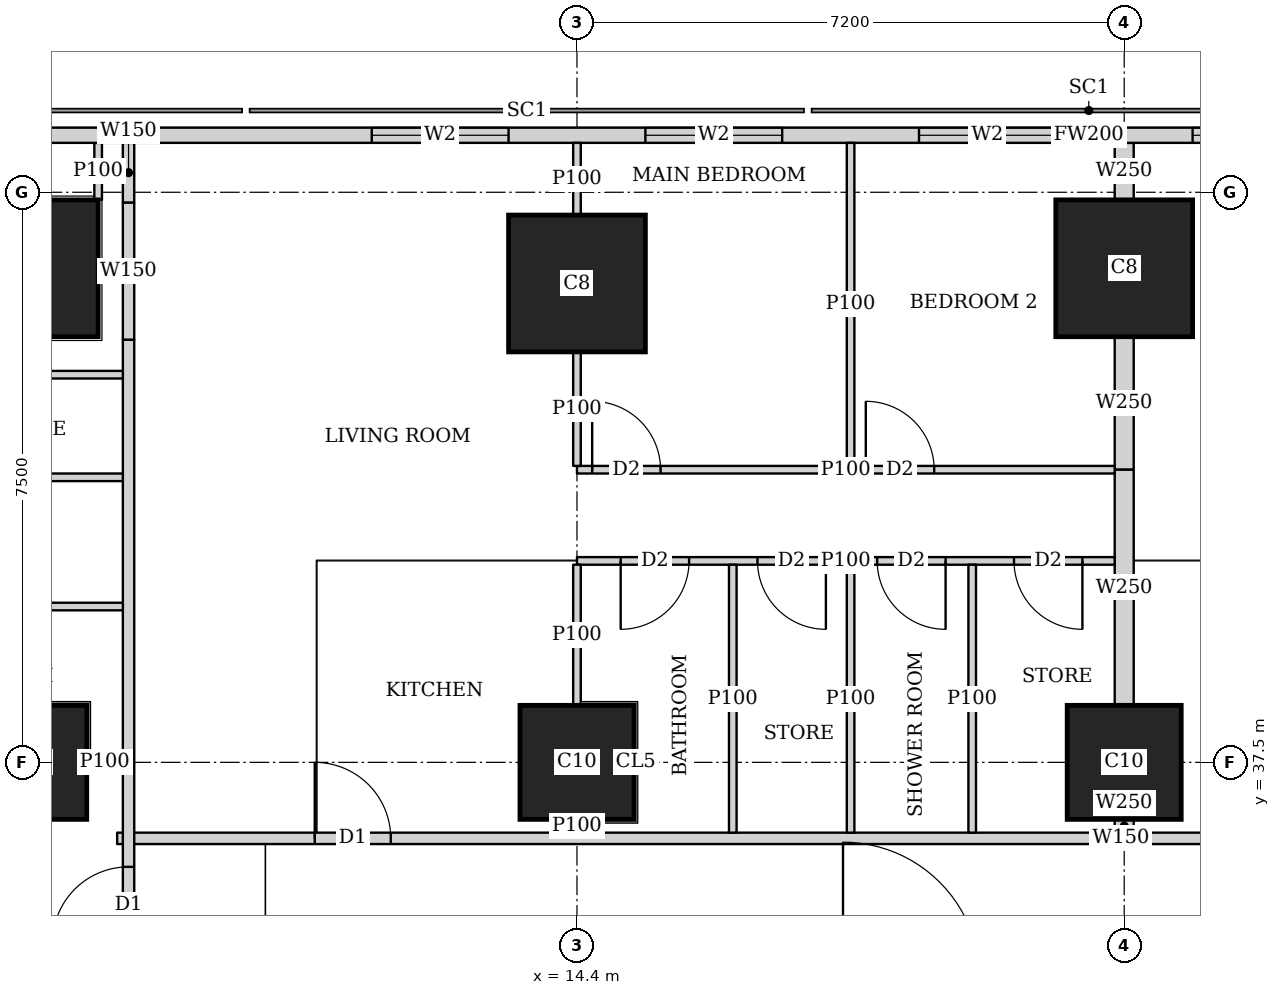
"""IFC4 building model, lengths in metres.
Left out: names, types, materials, properties, quantities, classifications, styles, units other than length and angle.
Written with IfcOpenShell. Run it as: python <this file> out.ifc"""

import sys

from ifc_helpers import new_model, si_unit, direction, frame, frame_2d, origin, origin_2d, place, context, subcontext, project, spatial, rectangle, extrude, element, fill, save


model = new_model("IFC4")
c1 = context("Model", 3, precision=1e-05, world=origin(), true_north=direction((0.0, 1.0)))
c2 = subcontext(c1, "Body", "Model", "MODEL_VIEW")
j1 = project(units=[si_unit("LENGTHUNIT", "METRE"), si_unit("PLANEANGLEUNIT", "RADIAN")], contexts=[c1])
p1 = place(None, origin())
s1 = spatial("IfcSite", under=j1, at=p1, CompositionType="ELEMENT")
p2 = place(p1, origin())
s2 = spatial("IfcBuilding", under=s1, at=p2, CompositionType="ELEMENT")
p3 = place(p2, frame((0.0, 0.0, 184.55)))
s3 = spatial("IfcBuildingStorey", under=s2, at=p3, CompositionType="ELEMENT", Elevation=184.55)
for number, where, z_axis, x_axis in (
    (1, (7.2, 37.5, 0.0), (0.0, 0.0, 1.0), (1.0, 0.0, 0.0)),
    (2, (14.4, 37.5, 0.0), (0.0, 0.0, 1.0), (1.0, 0.0, 0.0)),
    (3, (21.6, 37.5, 0.0), (0.0, 0.0, 1.0), (1.0, 0.0, 0.0)),
):
    element("IfcColumn", number, at=place(p3, frame(where, z_axis=z_axis, x_axis=x_axis)), inside=s3, PredefinedType="COLUMN", context=c2, shape_type="SweptSolid", body=[
        extrude(rectangle(XDim=1.5, YDim=1.5, at=origin_2d()), origin(), (0.0, 0.0, 1.0), 3.75),
    ])
for number, where, z_axis, x_axis in (
    (4, (7.2, 44.0, 0.0), (0.0, 0.0, 1.0), (1.0, 0.0, 0.0)),
    (5, (14.4, 43.8, 0.0), (0.0, 0.0, 1.0), (1.0, 0.0, 0.0)),
    (6, (21.6, 44.0, 0.0), (0.0, 0.0, 1.0), (1.0, 0.0, 0.0)),
):
    element("IfcColumn", number, at=place(p3, frame(where, z_axis=z_axis, x_axis=x_axis)), inside=s3, PredefinedType="COLUMN", context=c2, shape_type="SweptSolid", body=[
        extrude(rectangle(XDim=1.8, YDim=1.8, at=origin_2d()), origin(), (0.0, 0.0, 1.0), 3.75),
    ])
p4 = place(p3, frame((40.106, 45.75, 0.0), z_axis=(0.0, 0.0, 1.0), x_axis=(-1.0, 0.0, 0.0)))
e7 = element("IfcWall", 7, at=p4, inside=s3, PredefinedType="SOLIDWALL", context=c2, shape_type="SweptSolid", body=[
    extrude(rectangle(XDim=37.943, YDim=0.2, at=frame_2d((18.971, 0.0))), origin(), (0.0, 0.0, 1.0), 3.45),
])
p5 = place(p4, frame((8.606, 0.0, 0.9)))
e8 = element("IfcOpeningElement", 8, at=p5, cuts=e7, PredefinedType="OPENING", context=c2, shape_type="SweptSolid", body=[
    extrude(rectangle(XDim=1.8, YDim=1.5, at=frame_2d((0.9, 0.75))), frame((0.0, 0.11, 0.0), z_axis=(0.0, -1.0, 0.0), x_axis=(1.0, 0.0, 0.0)), (0.0, 0.0, 1.0), 0.22),
])
p6 = place(p4, frame((12.206, 0.0, 0.9)))
e9 = element("IfcOpeningElement", 9, at=p6, cuts=e7, PredefinedType="OPENING", context=c2, shape_type="SweptSolid", body=[
    extrude(rectangle(XDim=1.8, YDim=1.5, at=frame_2d((0.9, 0.75))), frame((0.0, 0.11, 0.0), z_axis=(0.0, -1.0, 0.0), x_axis=(1.0, 0.0, 0.0)), (0.0, 0.0, 1.0), 0.22),
])
p7 = place(p4, frame((15.806, 0.0, 0.9)))
e10 = element("IfcOpeningElement", 10, at=p7, cuts=e7, PredefinedType="OPENING", context=c2, shape_type="SweptSolid", body=[
    extrude(rectangle(XDim=1.8, YDim=1.5, at=frame_2d((0.9, 0.75))), frame((0.0, 0.11, 0.0), z_axis=(0.0, -1.0, 0.0), x_axis=(1.0, 0.0, 0.0)), (0.0, 0.0, 1.0), 0.22),
])
p8 = place(p4, frame((19.406, 0.0, 0.9)))
e11 = element("IfcOpeningElement", 11, at=p8, cuts=e7, PredefinedType="OPENING", context=c2, shape_type="SweptSolid", body=[
    extrude(rectangle(XDim=1.8, YDim=1.5, at=frame_2d((0.9, 0.75))), frame((0.0, 0.11, 0.0), z_axis=(0.0, -1.0, 0.0), x_axis=(1.0, 0.0, 0.0)), (0.0, 0.0, 1.0), 0.22),
])
p9 = place(p4, frame((23.006, 0.0, 0.9)))
e12 = element("IfcOpeningElement", 12, at=p9, cuts=e7, PredefinedType="OPENING", context=c2, shape_type="SweptSolid", body=[
    extrude(rectangle(XDim=1.8, YDim=1.5, at=frame_2d((0.9, 0.75))), frame((0.0, 0.11, 0.0), z_axis=(0.0, -1.0, 0.0), x_axis=(1.0, 0.0, 0.0)), (0.0, 0.0, 1.0), 0.22),
])
p10 = place(p4, frame((26.606, 0.0, 0.9)))
e13 = element("IfcOpeningElement", 13, at=p10, cuts=e7, PredefinedType="OPENING", context=c2, shape_type="SweptSolid", body=[
    extrude(rectangle(XDim=1.8, YDim=1.5, at=frame_2d((0.9, 0.75))), frame((0.0, 0.11, 0.0), z_axis=(0.0, -1.0, 0.0), x_axis=(1.0, 0.0, 0.0)), (0.0, 0.0, 1.0), 0.22),
])
p11 = place(p3, frame((8.5, 1.964, 0.0), z_axis=(0.0, 0.0, 1.0), x_axis=(0.0, 1.0, 0.0)))
e14 = element("IfcWall", 14, at=p11, inside=s3, PredefinedType="SOLIDWALL", context=c2, shape_type="SweptSolid", body=[
    extrude(rectangle(XDim=41.097, YDim=0.15, at=frame_2d((20.548, 0.0))), origin(), (0.0, 0.0, 1.0), 3.45),
])
p12 = place(p11, frame((10.661, 0.0, 0.0)))
e15 = element("IfcOpeningElement", 15, at=p12, cuts=e14, PredefinedType="OPENING", context=c2, shape_type="SweptSolid", body=[
    extrude(rectangle(XDim=1.0, YDim=2.1, at=frame_2d((0.5, 1.05))), frame((0.0, 0.085, 0.0), z_axis=(0.0, -1.0, 0.0), x_axis=(1.0, 0.0, 0.0)), (0.0, 0.0, 1.0), 0.17),
])
p13 = place(p11, frame((14.411, 0.0, 0.0)))
e16 = element("IfcOpeningElement", 16, at=p13, cuts=e14, PredefinedType="OPENING", context=c2, shape_type="SweptSolid", body=[
    extrude(rectangle(XDim=1.0, YDim=2.1, at=frame_2d((0.5, 1.05))), frame((0.0, 0.085, 0.0), z_axis=(0.0, -1.0, 0.0), x_axis=(1.0, 0.0, 0.0)), (0.0, 0.0, 1.0), 0.17),
])
p14 = place(p11, frame((21.911, 0.0, 0.0)))
e17 = element("IfcOpeningElement", 17, at=p14, cuts=e14, PredefinedType="OPENING", context=c2, shape_type="SweptSolid", body=[
    extrude(rectangle(XDim=1.0, YDim=2.1, at=frame_2d((0.5, 1.05))), frame((0.0, 0.085, 0.0), z_axis=(0.0, -1.0, 0.0), x_axis=(1.0, 0.0, 0.0)), (0.0, 0.0, 1.0), 0.17),
])
p15 = place(p11, frame((33.161, 0.0, 0.0)))
e18 = element("IfcOpeningElement", 18, at=p15, cuts=e14, PredefinedType="OPENING", context=c2, shape_type="SweptSolid", body=[
    extrude(rectangle(XDim=1.0, YDim=2.1, at=frame_2d((0.5, 1.05))), frame((0.0, 0.085, 0.0), z_axis=(0.0, -1.0, 0.0), x_axis=(1.0, 0.0, 0.0)), (0.0, 0.0, 1.0), 0.17),
])
p16 = place(p3, frame((8.5, 43.061, 0.0), z_axis=(0.0, 0.0, 1.0), x_axis=(0.0, 1.0, 0.0)))
e19 = element("IfcWall", 19, at=p16, inside=s3, PredefinedType="SOLIDWALL", context=c2, shape_type="SweptSolid", body=[
    extrude(rectangle(XDim=1.805, YDim=0.15, at=frame_2d((0.902, 0.0))), origin(), (0.0, 0.0, 1.0), 2.05),
])
p17 = place(p3, frame((8.5, 44.866, 0.0), z_axis=(0.0, 0.0, 1.0), x_axis=(0.0, 1.0, 0.0)))
e20 = element("IfcWall", 20, at=p17, inside=s3, PredefinedType="SOLIDWALL", context=c2, shape_type="SweptSolid", body=[
    extrude(rectangle(XDim=0.784, YDim=0.15, at=frame_2d((0.392, 0.0))), origin(), (0.0, 0.0, 1.0), 3.45),
])
p18 = place(p3, frame((8.35, 36.5, 0.0), z_axis=(0.0, 0.0, 1.0), x_axis=(1.0, 0.0, 0.0)))
e21 = element("IfcWall", 21, at=p18, inside=s3, PredefinedType="SOLIDWALL", context=c2, shape_type="SweptSolid", body=[
    extrude(rectangle(XDim=26.415, YDim=0.15, at=frame_2d((13.208, 0.0))), origin(), (0.0, 0.0, 1.0), 3.45),
])
p19 = place(p18, frame((2.6, 0.0, 0.0)))
e22 = element("IfcOpeningElement", 22, at=p19, cuts=e21, PredefinedType="OPENING", context=c2, shape_type="SweptSolid", body=[
    extrude(rectangle(XDim=1.0, YDim=2.1, at=frame_2d((0.5, 1.05))), frame((0.0, 0.085, 0.0), z_axis=(0.0, -1.0, 0.0), x_axis=(1.0, 0.0, 0.0)), (0.0, 0.0, 1.0), 0.17),
])
p20 = place(p18, frame((14.75, 0.0, 0.0)))
e23 = element("IfcOpeningElement", 23, at=p20, cuts=e21, PredefinedType="OPENING", context=c2, shape_type="SweptSolid", body=[
    extrude(rectangle(XDim=1.0, YDim=2.1, at=frame_2d((0.5, 1.05))), frame((0.0, 0.085, 0.0), z_axis=(0.0, -1.0, 0.0), x_axis=(1.0, 0.0, 0.0)), (0.0, 0.0, 1.0), 0.17),
])
p21 = place(p18, frame((23.923, 0.0, 0.0)))
e24 = element("IfcOpeningElement", 24, at=p21, cuts=e21, PredefinedType="OPENING", context=c2, shape_type="SweptSolid", body=[
    extrude(rectangle(XDim=1.0, YDim=2.1, at=frame_2d((0.5, 1.05))), frame((0.0, 0.085, 0.0), z_axis=(0.0, -1.0, 0.0), x_axis=(1.0, 0.0, 0.0)), (0.0, 0.0, 1.0), 0.17),
])
p22 = place(p3, frame((8.1, 45.65, 0.0), z_axis=(0.0, 0.0, 1.0), x_axis=(0.0, -1.0, 0.0)))
e25 = element("IfcWall", 25, at=p22, inside=s3, PredefinedType="PARTITIONING", context=c2, shape_type="SweptSolid", body=[
    extrude(rectangle(XDim=0.749, YDim=0.1, at=frame_2d((0.375, 0.0))), origin(), (0.0, 0.0, 1.0), 3.45),
])
p23 = place(p3, frame((7.951, 37.5, 0.0), z_axis=(0.0, 0.0, 1.0), x_axis=(1.0, 0.0, 0.0)))
e26 = element("IfcWall", 26, at=p23, inside=s3, PredefinedType="PARTITIONING", context=c2, shape_type="SweptSolid", body=[
    extrude(rectangle(XDim=0.474, YDim=0.1, at=frame_2d((0.237, 0.0))), origin(), (0.0, 0.0, 1.0), 3.45),
])
for number, where, z_axis, x_axis in (
    (27, (4.9, 41.25, 0.0), (0.0, 0.0, 1.0), (1.0, 0.0, 0.0)),
    (28, (4.9, 39.55, 0.0), (0.0, 0.0, 1.0), (1.0, 0.0, 0.0)),
):
    element("IfcWall", number, at=place(p3, frame(where, z_axis=z_axis, x_axis=x_axis)), inside=s3, PredefinedType="PARTITIONING", context=c2, shape_type="SweptSolid", body=[
        extrude(rectangle(XDim=3.525, YDim=0.1, at=frame_2d((1.763, 0.0))), origin(), (0.0, 0.0, 1.0), 3.45),
    ])
p24 = place(p3, frame((14.4, 41.35, 0.0), z_axis=(0.0, 0.0, 1.0), x_axis=(1.0, 0.0, 0.0)))
e29 = element("IfcWall", 29, at=p24, inside=s3, PredefinedType="PARTITIONING", context=c2, shape_type="SweptSolid", body=[
    extrude(rectangle(XDim=7.075, YDim=0.1, at=frame_2d((3.538, 0.0))), origin(), (0.0, 0.0, 1.0), 3.45),
])
p25 = place(p24, frame((0.2, 0.0, 0.0)))
e30 = element("IfcOpeningElement", 30, at=p25, cuts=e29, PredefinedType="OPENING", context=c2, shape_type="SweptSolid", body=[
    extrude(rectangle(XDim=0.9, YDim=2.1, at=frame_2d((0.45, 1.05))), frame((0.0, 0.06, 0.0), z_axis=(0.0, -1.0, 0.0), x_axis=(1.0, 0.0, 0.0)), (0.0, 0.0, 1.0), 0.12),
])
p26 = place(p24, frame((3.8, 0.0, 0.0)))
e31 = element("IfcOpeningElement", 31, at=p26, cuts=e29, PredefinedType="OPENING", context=c2, shape_type="SweptSolid", body=[
    extrude(rectangle(XDim=0.9, YDim=2.1, at=frame_2d((0.45, 1.05))), frame((0.0, 0.06, 0.0), z_axis=(0.0, -1.0, 0.0), x_axis=(1.0, 0.0, 0.0)), (0.0, 0.0, 1.0), 0.12),
])
p27 = place(p3, frame((14.4, 40.15, 0.0), z_axis=(0.0, 0.0, 1.0), x_axis=(1.0, 0.0, 0.0)))
e32 = element("IfcWall", 32, at=p27, inside=s3, PredefinedType="PARTITIONING", context=c2, shape_type="SweptSolid", body=[
    extrude(rectangle(XDim=7.075, YDim=0.1, at=frame_2d((3.538, 0.0))), origin(), (0.0, 0.0, 1.0), 3.45),
])
p28 = place(p27, frame((0.575, 0.0, 0.0)))
e33 = element("IfcOpeningElement", 33, at=p28, cuts=e32, PredefinedType="OPENING", context=c2, shape_type="SweptSolid", body=[
    extrude(rectangle(XDim=0.9, YDim=2.1, at=frame_2d((0.45, 1.05))), frame((0.0, 0.06, 0.0), z_axis=(0.0, -1.0, 0.0), x_axis=(1.0, 0.0, 0.0)), (0.0, 0.0, 1.0), 0.12),
])
p29 = place(p27, frame((3.95, 0.0, 0.0)))
e34 = element("IfcOpeningElement", 34, at=p29, cuts=e32, PredefinedType="OPENING", context=c2, shape_type="SweptSolid", body=[
    extrude(rectangle(XDim=0.9, YDim=2.1, at=frame_2d((0.45, 1.05))), frame((0.0, 0.06, 0.0), z_axis=(0.0, -1.0, 0.0), x_axis=(1.0, 0.0, 0.0)), (0.0, 0.0, 1.0), 0.12),
])
p30 = place(p27, frame((2.375, 0.0, 0.0)))
e35 = element("IfcOpeningElement", 35, at=p30, cuts=e32, PredefinedType="OPENING", context=c2, shape_type="SweptSolid", body=[
    extrude(rectangle(XDim=0.9, YDim=2.1, at=frame_2d((0.45, 1.05))), frame((0.0, 0.06, 0.0), z_axis=(0.0, -1.0, 0.0), x_axis=(1.0, 0.0, 0.0)), (0.0, 0.0, 1.0), 0.12),
])
p31 = place(p27, frame((5.75, 0.0, 0.0)))
e36 = element("IfcOpeningElement", 36, at=p31, cuts=e32, PredefinedType="OPENING", context=c2, shape_type="SweptSolid", body=[
    extrude(rectangle(XDim=0.9, YDim=2.1, at=frame_2d((0.45, 1.05))), frame((0.0, 0.06, 0.0), z_axis=(0.0, -1.0, 0.0), x_axis=(1.0, 0.0, 0.0)), (0.0, 0.0, 1.0), 0.12),
])
p32 = place(p3, frame((14.4, 41.4, 0.0), z_axis=(0.0, 0.0, 1.0), x_axis=(0.0, 1.0, 0.0)))
e37 = element("IfcWall", 37, at=p32, inside=s3, PredefinedType="PARTITIONING", context=c2, shape_type="SweptSolid", body=[
    extrude(rectangle(XDim=1.499, YDim=0.1, at=frame_2d((0.75, 0.0))), origin(), (0.0, 0.0, 1.0), 3.45),
])
p33 = place(p3, frame((14.4, 44.701, 0.0), z_axis=(0.0, 0.0, 1.0), x_axis=(0.0, 1.0, 0.0)))
e38 = element("IfcWall", 38, at=p33, inside=s3, PredefinedType="PARTITIONING", context=c2, shape_type="SweptSolid", body=[
    extrude(rectangle(XDim=0.949, YDim=0.1, at=frame_2d((0.475, 0.0))), origin(), (0.0, 0.0, 1.0), 3.45),
])
p34 = place(p3, frame((18.0, 41.4, 0.0), z_axis=(0.0, 0.0, 1.0), x_axis=(0.0, 1.0, 0.0)))
e39 = element("IfcWall", 39, at=p34, inside=s3, PredefinedType="PARTITIONING", context=c2, shape_type="SweptSolid", body=[
    extrude(rectangle(XDim=4.25, YDim=0.1, at=frame_2d((2.125, 0.0))), origin(), (0.0, 0.0, 1.0), 2.05),
])
p35 = place(p3, frame((14.4, 36.575, 0.0), z_axis=(0.0, 0.0, 1.0), x_axis=(0.0, 1.0, 0.0)))
e40 = element("IfcWall", 40, at=p35, inside=s3, PredefinedType="PARTITIONING", context=c2, shape_type="SweptSolid", body=[
    extrude(rectangle(XDim=0.174, YDim=0.1, at=frame_2d((0.087, 0.0))), origin(), (0.0, 0.0, 1.0), 3.45),
])
p36 = place(p3, frame((14.4, 38.251, 0.0), z_axis=(0.0, 0.0, 1.0), x_axis=(0.0, 1.0, 0.0)))
e41 = element("IfcWall", 41, at=p36, inside=s3, PredefinedType="PARTITIONING", context=c2, shape_type="SweptSolid", body=[
    extrude(rectangle(XDim=1.849, YDim=0.1, at=frame_2d((0.925, 0.0))), origin(), (0.0, 0.0, 1.0), 3.45),
])
for number, where, z_axis, x_axis in (
    (42, (18.0, 36.575, 0.0), (0.0, 0.0, 1.0), (0.0, 1.0, 0.0)),
    (43, (16.45, 36.575, 0.0), (0.0, 0.0, 1.0), (0.0, 1.0, 0.0)),
    (44, (19.6, 36.575, 0.0), (0.0, 0.0, 1.0), (0.0, 1.0, 0.0)),
):
    element("IfcWall", number, at=place(p3, frame(where, z_axis=z_axis, x_axis=x_axis)), inside=s3, PredefinedType="PARTITIONING", context=c2, shape_type="SweptSolid", body=[
        extrude(rectangle(XDim=3.525, YDim=0.1, at=frame_2d((1.763, 0.0))), origin(), (0.0, 0.0, 1.0), 3.45),
    ])
p37 = place(p3, frame((21.6, 41.35, 0.0), z_axis=(0.0, 0.0, 1.0), x_axis=(0.0, 1.0, 0.0)))
e45 = element("IfcWall", 45, at=p37, inside=s3, PredefinedType="SOLIDWALL", context=c2, shape_type="SweptSolid", body=[
    extrude(rectangle(XDim=1.749, YDim=0.25, at=frame_2d((0.875, 0.0))), origin(), (0.0, 0.0, 1.0), 2.05),
])
p38 = place(p3, frame((21.6, 44.901, 0.0), z_axis=(0.0, 0.0, 1.0), x_axis=(0.0, 1.0, 0.0)))
e46 = element("IfcWall", 46, at=p38, inside=s3, PredefinedType="SOLIDWALL", context=c2, shape_type="SweptSolid", body=[
    extrude(rectangle(XDim=0.749, YDim=0.25, at=frame_2d((0.375, 0.0))), origin(), (0.0, 0.0, 1.0), 2.05),
])
p39 = place(p3, frame((21.6, 36.575, 0.0), z_axis=(0.0, 0.0, 1.0), x_axis=(0.0, 1.0, 0.0)))
e47 = element("IfcWall", 47, at=p39, inside=s3, PredefinedType="SOLIDWALL", context=c2, shape_type="SweptSolid", body=[
    extrude(rectangle(XDim=0.174, YDim=0.25, at=frame_2d((0.087, 0.0))), origin(), (0.0, 0.0, 1.0), 3.45),
])
p40 = place(p3, frame((21.6, 38.251, 0.0), z_axis=(0.0, 0.0, 1.0), x_axis=(0.0, 1.0, 0.0)))
e48 = element("IfcWall", 48, at=p40, inside=s3, PredefinedType="SOLIDWALL", context=c2, shape_type="SweptSolid", body=[
    extrude(rectangle(XDim=3.099, YDim=0.25, at=frame_2d((1.55, 0.0))), origin(), (0.0, 0.0, 1.0), 3.45),
])
p41 = place(p3, frame((8.425, 42.6, 0.0), z_axis=(0.0, 0.0, 1.0), x_axis=(-1.0, 0.0, 0.0)))
e49 = element("IfcWall", 49, at=p41, inside=s3, PredefinedType="PARTITIONING", context=c2, shape_type="SweptSolid", body=[
    extrude(rectangle(XDim=3.022, YDim=0.1, at=frame_2d((1.511, 0.0))), origin(), (0.0, 0.0, 1.0), 3.45),
])
p42 = place(p41, frame((1.95, 0.0, 0.0)))
e50 = element("IfcOpeningElement", 50, at=p42, cuts=e49, PredefinedType="OPENING", context=c2, shape_type="SweptSolid", body=[
    extrude(rectangle(XDim=0.9, YDim=2.1, at=frame_2d((0.45, 1.05))), frame((0.0, 0.06, 0.0), z_axis=(0.0, -1.0, 0.0), x_axis=(1.0, 0.0, 0.0)), (0.0, 0.0, 1.0), 0.12),
])
p43 = place(p7, origin())
e51 = element("IfcWindow", 51, at=p43, inside=s3, PartitioningType="SINGLE_PANEL", PredefinedType="WINDOW", context=c2, shape_type="SweptSolid", body=[
    extrude(rectangle(XDim=1.8, YDim=1.5, at=frame_2d((0.9, 0.75))), frame((0.0, 0.03, 0.0), z_axis=(0.0, -1.0, 0.0), x_axis=(1.0, 0.0, 0.0)), (0.0, 0.0, 1.0), 0.06),
])
fill(e10, e51)
p44 = place(p8, origin())
e52 = element("IfcWindow", 52, at=p44, inside=s3, PartitioningType="SINGLE_PANEL", PredefinedType="WINDOW", context=c2, shape_type="SweptSolid", body=[
    extrude(rectangle(XDim=1.8, YDim=1.5, at=frame_2d((0.9, 0.75))), frame((0.0, 0.03, 0.0), z_axis=(0.0, -1.0, 0.0), x_axis=(1.0, 0.0, 0.0)), (0.0, 0.0, 1.0), 0.06),
])
fill(e11, e52)
p45 = place(p9, origin())
e53 = element("IfcWindow", 53, at=p45, inside=s3, PartitioningType="SINGLE_PANEL", PredefinedType="WINDOW", context=c2, shape_type="SweptSolid", body=[
    extrude(rectangle(XDim=1.8, YDim=1.5, at=frame_2d((0.9, 0.75))), frame((0.0, 0.03, 0.0), z_axis=(0.0, -1.0, 0.0), x_axis=(1.0, 0.0, 0.0)), (0.0, 0.0, 1.0), 0.06),
])
fill(e12, e53)
p46 = place(p10, origin())
e54 = element("IfcWindow", 54, at=p46, inside=s3, PartitioningType="SINGLE_PANEL", PredefinedType="WINDOW", context=c2, shape_type="SweptSolid", body=[
    extrude(rectangle(XDim=1.8, YDim=1.5, at=frame_2d((0.9, 0.75))), frame((0.0, 0.03, 0.0), z_axis=(0.0, -1.0, 0.0), x_axis=(1.0, 0.0, 0.0)), (0.0, 0.0, 1.0), 0.06),
])
fill(e13, e54)
p47 = place(p15, origin())
e55 = element("IfcDoor", 55, at=p47, inside=s3, OperationType="SINGLE_SWING_LEFT", PredefinedType="DOOR", context=c2, shape_type="SweptSolid", body=[
    extrude(rectangle(XDim=1.0, YDim=2.1, at=frame_2d((0.5, 1.05))), frame((0.0, 0.025, 0.0), z_axis=(0.0, -1.0, 0.0), x_axis=(1.0, 0.0, 0.0)), (0.0, 0.0, 1.0), 0.05),
])
fill(e18, e55)
p48 = place(p25, origin())
e56 = element("IfcDoor", 56, at=p48, inside=s3, OperationType="SINGLE_SWING_LEFT", PredefinedType="DOOR", context=c2, shape_type="SweptSolid", body=[
    extrude(rectangle(XDim=0.9, YDim=2.1, at=frame_2d((0.45, 1.05))), frame((0.0, 0.025, 0.0), z_axis=(0.0, -1.0, 0.0), x_axis=(1.0, 0.0, 0.0)), (0.0, 0.0, 1.0), 0.05),
])
fill(e30, e56)
p49 = place(p26, origin())
e57 = element("IfcDoor", 57, at=p49, inside=s3, OperationType="SINGLE_SWING_LEFT", PredefinedType="DOOR", context=c2, shape_type="SweptSolid", body=[
    extrude(rectangle(XDim=0.9, YDim=2.1, at=frame_2d((0.45, 1.05))), frame((0.0, 0.025, 0.0), z_axis=(0.0, -1.0, 0.0), x_axis=(1.0, 0.0, 0.0)), (0.0, 0.0, 1.0), 0.05),
])
fill(e31, e57)
p50 = place(p28, origin())
e58 = element("IfcDoor", 58, at=p50, inside=s3, OperationType="SINGLE_SWING_RIGHT", PredefinedType="DOOR", context=c2, shape_type="SweptSolid", body=[
    extrude(rectangle(XDim=0.9, YDim=2.1, at=frame_2d((0.45, 1.05))), frame((0.0, 0.025, 0.0), z_axis=(0.0, -1.0, 0.0), x_axis=(1.0, 0.0, 0.0)), (0.0, 0.0, 1.0), 0.05),
])
fill(e33, e58)
p51 = place(p29, origin())
e59 = element("IfcDoor", 59, at=p51, inside=s3, OperationType="SINGLE_SWING_LEFT", PredefinedType="DOOR", context=c2, shape_type="SweptSolid", body=[
    extrude(rectangle(XDim=0.9, YDim=2.1, at=frame_2d((0.45, 1.05))), frame((0.0, 0.025, 0.0), z_axis=(0.0, -1.0, 0.0), x_axis=(1.0, 0.0, 0.0)), (0.0, 0.0, 1.0), 0.05),
])
fill(e34, e59)
p52 = place(p30, origin())
e60 = element("IfcDoor", 60, at=p52, inside=s3, OperationType="SINGLE_SWING_LEFT", PredefinedType="DOOR", context=c2, shape_type="SweptSolid", body=[
    extrude(rectangle(XDim=0.9, YDim=2.1, at=frame_2d((0.45, 1.05))), frame((0.0, 0.025, 0.0), z_axis=(0.0, -1.0, 0.0), x_axis=(1.0, 0.0, 0.0)), (0.0, 0.0, 1.0), 0.05),
])
fill(e35, e60)
p53 = place(p31, origin())
e61 = element("IfcDoor", 61, at=p53, inside=s3, OperationType="SINGLE_SWING_LEFT", PredefinedType="DOOR", context=c2, shape_type="SweptSolid", body=[
    extrude(rectangle(XDim=0.9, YDim=2.1, at=frame_2d((0.45, 1.05))), frame((0.0, 0.025, 0.0), z_axis=(0.0, -1.0, 0.0), x_axis=(1.0, 0.0, 0.0)), (0.0, 0.0, 1.0), 0.05),
])
fill(e36, e61)
p54 = place(p19, origin())
e62 = element("IfcDoor", 62, at=p54, inside=s3, OperationType="SINGLE_SWING_LEFT", PredefinedType="DOOR", context=c2, shape_type="SweptSolid", body=[
    extrude(rectangle(XDim=1.0, YDim=2.1, at=frame_2d((0.5, 1.05))), frame((0.0, 0.025, 0.0), z_axis=(0.0, -1.0, 0.0), x_axis=(1.0, 0.0, 0.0)), (0.0, 0.0, 1.0), 0.05),
])
fill(e22, e62)
save(model, sys.argv[1])
